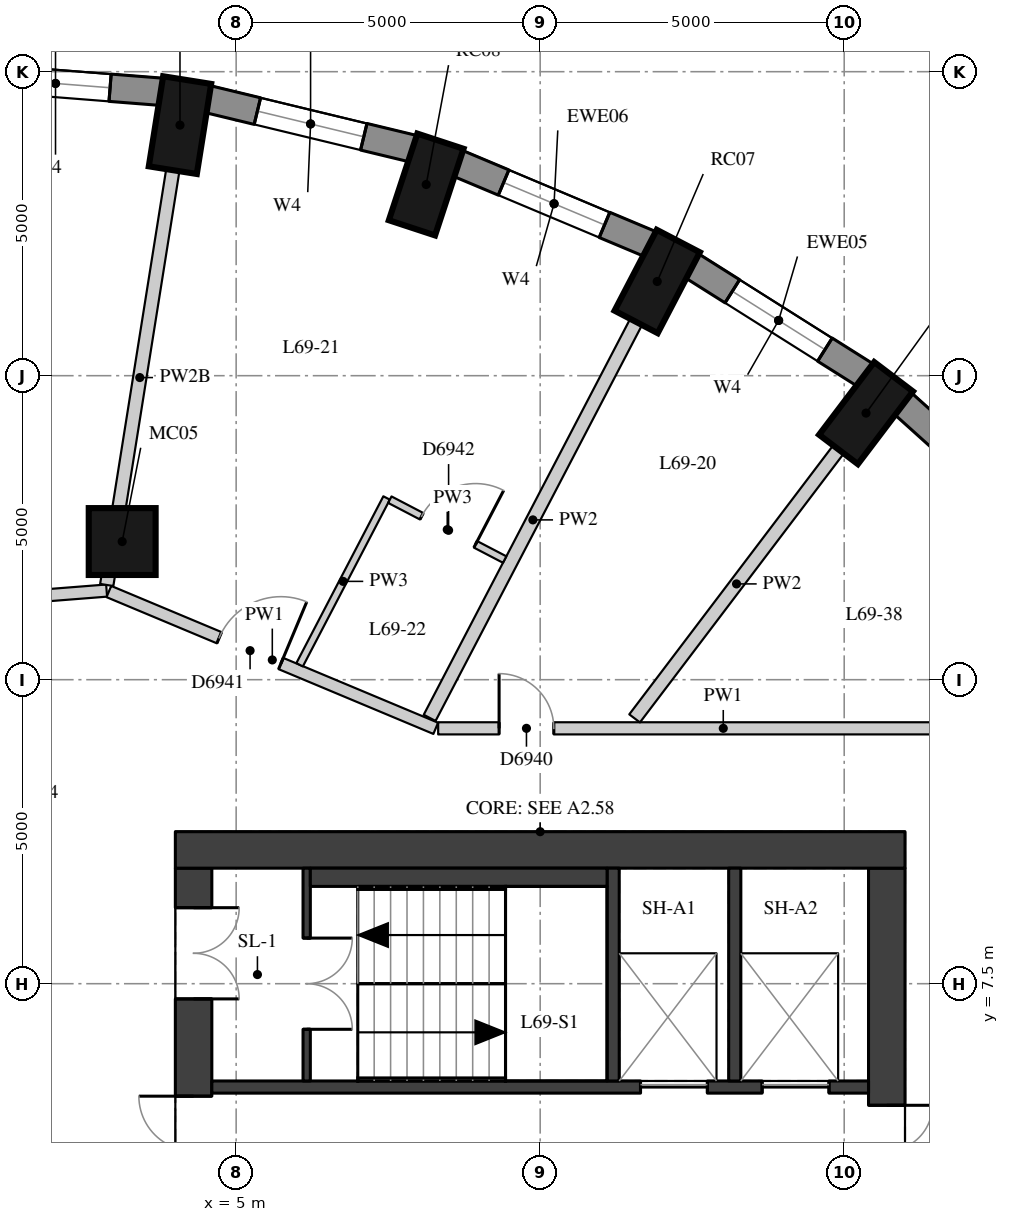
"""IFC4 building model, lengths in metres.
Left out: names, types, materials, properties, quantities, classifications, styles, units other than length and angle.
Written with IfcOpenShell. Run it as: python <this file> out.ifc"""

import sys

from ifc_helpers import new_model, si_unit, direction, frame, frame_2d, origin, origin_2d, place, context, subcontext, project, spatial, rectangle, extrude, element, fill, save


model = new_model("IFC4")
c1 = context("Model", 3, precision=1e-05, world=origin(), true_north=direction((0.0, 1.0)))
c2 = subcontext(c1, "Body", "Model", "MODEL_VIEW")
j1 = project(units=[si_unit("LENGTHUNIT", "METRE"), si_unit("PLANEANGLEUNIT", "RADIAN")], contexts=[c1])
p1 = place(None, origin())
s1 = spatial("IfcSite", under=j1, at=p1, CompositionType="ELEMENT")
p2 = place(p1, origin())
s2 = spatial("IfcBuilding", under=s1, at=p2, CompositionType="ELEMENT")
p3 = place(p2, frame((0.0, 0.0, 243.2)))
s3 = spatial("IfcBuildingStorey", under=s2, at=p3, CompositionType="ELEMENT", Elevation=243.2)
for number, where, z_axis, x_axis in (
    (1, (15.359, 16.885, 0.0), (0.0, 0.0, 1.0), (0.604, 0.797, 0.0)),
    (2, (11.925, 19.05, 0.0), (0.0, 0.0, 1.0), (0.462, 0.887, 0.0)),
    (3, (8.125, 20.644, 0.0), (0.0, 0.0, 1.0), (0.312, 0.95, 0.0)),
    (4, (4.076, 21.621, 0.0), (0.0, 0.0, 1.0), (0.157, 0.988, 0.0)),
):
    element("IfcColumn", number, at=place(p3, frame(where, z_axis=z_axis, x_axis=x_axis)), inside=s3, PredefinedType="COLUMN", context=c2, shape_type="SweptSolid", body=[
        extrude(rectangle(XDim=1.5, YDim=0.8, at=origin_2d()), origin(), (0.0, 0.0, 1.0), 3.3),
    ])
p4 = place(p3, frame((3.126, 14.772, 0.0), z_axis=(0.0, 0.0, 1.0), x_axis=(1.0, 0.0, 0.0)))
e5 = element("IfcColumn", 5, at=p4, inside=s3, PredefinedType="COLUMN", context=c2, shape_type="SweptSolid", body=[
    extrude(rectangle(XDim=1.1, YDim=1.1, at=origin_2d()), origin(), (0.0, 0.0, 1.0), 3.3),
])
p5 = place(p3, frame((18.424, 14.828, 0.0), z_axis=(0.0, 0.0, 1.0), x_axis=(-0.743166014219, 0.669107073128, 0.0)))
e6 = element("IfcWall", 6, at=p5, inside=s3, PredefinedType="SOLIDWALL", context=c2, shape_type="SweptSolid", body=[
    extrude(rectangle(XDim=3.316, YDim=0.45, at=frame_2d((1.658, 0.0))), origin(), (0.0, 0.0, 1.0), 3.02),
])
p6 = place(p3, frame((15.353, 17.506, 0.0), z_axis=(0.0, 0.0, 1.0), x_axis=(-0.845929139811, 0.53329531258, 0.0)))
e7 = element("IfcWall", 7, at=p6, inside=s3, PredefinedType="SOLIDWALL", context=c2, shape_type="SweptSolid", body=[
    extrude(rectangle(XDim=3.385, YDim=0.45, at=frame_2d((1.692, 0.0))), origin(), (0.0, 0.0, 1.0), 3.02),
])
p7 = place(p6, frame((0.792, 0.0, 0.4)))
e8 = element("IfcOpeningElement", 8, at=p7, cuts=e7, PredefinedType="OPENING", context=c2, shape_type="SweptSolid", body=[
    extrude(rectangle(XDim=1.8, YDim=1.75, at=frame_2d((0.9, 0.875))), frame((0.0, 0.235, 0.0), z_axis=(0.0, -1.0, 0.0), x_axis=(1.0, 0.0, 0.0)), (0.0, 0.0, 1.0), 0.47),
])
p8 = place(p3, frame((11.816, 19.662, 0.0), z_axis=(0.0, 0.0, 1.0), x_axis=(-0.922024627475, 0.387131226239, 0.0)))
e9 = element("IfcWall", 9, at=p8, inside=s3, PredefinedType="SOLIDWALL", context=c2, shape_type="SweptSolid", body=[
    extrude(rectangle(XDim=3.443, YDim=0.45, at=frame_2d((1.722, 0.0))), origin(), (0.0, 0.0, 1.0), 3.02),
])
p9 = place(p8, frame((0.822, 0.0, 0.4)))
e10 = element("IfcOpeningElement", 10, at=p9, cuts=e9, PredefinedType="OPENING", context=c2, shape_type="SweptSolid", body=[
    extrude(rectangle(XDim=1.8, YDim=1.75, at=frame_2d((0.9, 0.875))), frame((0.0, 0.235, 0.0), z_axis=(0.0, -1.0, 0.0), x_axis=(1.0, 0.0, 0.0)), (0.0, 0.0, 1.0), 0.47),
])
p10 = place(p3, frame((7.919, 21.232, 0.0), z_axis=(0.0, 0.0, 1.0), x_axis=(-0.972099278496, 0.23456980357, 0.0)))
e11 = element("IfcWall", 11, at=p10, inside=s3, PredefinedType="SOLIDWALL", context=c2, shape_type="SweptSolid", body=[
    extrude(rectangle(XDim=3.487, YDim=0.45, at=frame_2d((1.743, 0.0))), origin(), (0.0, 0.0, 1.0), 3.02),
])
p11 = place(p10, frame((0.843, 0.0, 0.4)))
e12 = element("IfcOpeningElement", 12, at=p11, cuts=e11, PredefinedType="OPENING", context=c2, shape_type="SweptSolid", body=[
    extrude(rectangle(XDim=1.8, YDim=1.75, at=frame_2d((0.9, 0.875))), frame((0.0, 0.235, 0.0), z_axis=(0.0, -1.0, 0.0), x_axis=(1.0, 0.0, 0.0)), (0.0, 0.0, 1.0), 0.47),
])
p12 = place(p3, frame((3.779, 22.169, 0.0), z_axis=(0.0, 0.0, 1.0), x_axis=(-0.996910775835, 0.078542377245, 0.0)))
e13 = element("IfcWall", 13, at=p12, inside=s3, PredefinedType="SOLIDWALL", context=c2, shape_type="SweptSolid", body=[
    extrude(rectangle(XDim=3.509, YDim=0.45, at=frame_2d((1.755, 0.0))), origin(), (0.0, 0.0, 1.0), 3.02),
])
p13 = place(p12, frame((0.855, 0.0, 0.4)))
e14 = element("IfcOpeningElement", 14, at=p13, cuts=e13, PredefinedType="OPENING", context=c2, shape_type="SweptSolid", body=[
    extrude(rectangle(XDim=1.8, YDim=1.75, at=frame_2d((0.9, 0.875))), frame((0.0, 0.235, 0.0), z_axis=(0.0, -1.0, 0.0), x_axis=(1.0, 0.0, 0.0)), (0.0, 0.0, 1.0), 0.47),
])
p14 = place(p3, frame((4.3, -9.4, 0.0), z_axis=(0.0, 0.0, 1.0), x_axis=(0.0, 1.0, 0.0)))
e15 = element("IfcWall", 15, at=p14, inside=s3, PredefinedType="SHEAR", context=c2, shape_type="SweptSolid", body=[
    extrude(rectangle(XDim=18.8, YDim=0.6, at=frame_2d((9.4, 0.0))), origin(), (0.0, 0.0, 1.0), 3.02),
])
p15 = place(p14, frame((0.65, 0.0, 0.0)))
e16 = element("IfcOpeningElement", 16, at=p15, cuts=e15, PredefinedType="OPENING", context=c2, shape_type="SweptSolid", body=[
    extrude(rectangle(XDim=1.5, YDim=2.1, at=frame_2d((0.75, 1.05))), frame((0.0, 0.31, 0.0), z_axis=(0.0, -1.0, 0.0), x_axis=(1.0, 0.0, 0.0)), (0.0, 0.0, 1.0), 0.62),
])
p16 = place(p14, frame((3.75, 0.0, 0.0)))
e17 = element("IfcOpeningElement", 17, at=p16, cuts=e15, PredefinedType="OPENING", context=c2, shape_type="SweptSolid", body=[
    extrude(rectangle(XDim=1.8, YDim=2.1, at=frame_2d((0.9, 1.05))), frame((0.0, 0.31, 0.0), z_axis=(0.0, -1.0, 0.0), x_axis=(1.0, 0.0, 0.0)), (0.0, 0.0, 1.0), 0.62),
])
p17 = place(p14, frame((6.25, 0.0, 0.0)))
e18 = element("IfcOpeningElement", 18, at=p17, cuts=e15, PredefinedType="OPENING", context=c2, shape_type="SweptSolid", body=[
    extrude(rectangle(XDim=1.1, YDim=2.1, at=frame_2d((0.55, 1.05))), frame((0.0, 0.31, 0.0), z_axis=(0.0, -1.0, 0.0), x_axis=(1.0, 0.0, 0.0)), (0.0, 0.0, 1.0), 0.62),
])
p18 = place(p14, frame((8.9, 0.0, 0.0)))
e19 = element("IfcOpeningElement", 19, at=p18, cuts=e15, PredefinedType="OPENING", context=c2, shape_type="SweptSolid", body=[
    extrude(rectangle(XDim=1.0, YDim=2.1, at=frame_2d((0.5, 1.05))), frame((0.0, 0.31, 0.0), z_axis=(0.0, -1.0, 0.0), x_axis=(1.0, 0.0, 0.0)), (0.0, 0.0, 1.0), 0.62),
])
p19 = place(p14, frame((11.45, 0.0, 0.0)))
e20 = element("IfcOpeningElement", 20, at=p19, cuts=e15, PredefinedType="OPENING", context=c2, shape_type="SweptSolid", body=[
    extrude(rectangle(XDim=1.1, YDim=2.1, at=frame_2d((0.55, 1.05))), frame((0.0, 0.31, 0.0), z_axis=(0.0, -1.0, 0.0), x_axis=(1.0, 0.0, 0.0)), (0.0, 0.0, 1.0), 0.62),
])
p20 = place(p14, frame((13.25, 0.0, 0.0)))
e21 = element("IfcOpeningElement", 21, at=p20, cuts=e15, PredefinedType="OPENING", context=c2, shape_type="SweptSolid", body=[
    extrude(rectangle(XDim=1.8, YDim=2.1, at=frame_2d((0.9, 1.05))), frame((0.0, 0.31, 0.0), z_axis=(0.0, -1.0, 0.0), x_axis=(1.0, 0.0, 0.0)), (0.0, 0.0, 1.0), 0.62),
])
p21 = place(p14, frame((16.65, 0.0, 0.0)))
e22 = element("IfcOpeningElement", 22, at=p21, cuts=e15, PredefinedType="OPENING", context=c2, shape_type="SweptSolid", body=[
    extrude(rectangle(XDim=1.5, YDim=2.1, at=frame_2d((0.75, 1.05))), frame((0.0, 0.31, 0.0), z_axis=(0.0, -1.0, 0.0), x_axis=(1.0, 0.0, 0.0)), (0.0, 0.0, 1.0), 0.62),
])
p22 = place(p3, frame((15.7, -9.4, 0.0), z_axis=(0.0, 0.0, 1.0), x_axis=(0.0, 1.0, 0.0)))
e23 = element("IfcWall", 23, at=p22, inside=s3, PredefinedType="SHEAR", context=c2, shape_type="SweptSolid", body=[
    extrude(rectangle(XDim=18.8, YDim=0.6, at=frame_2d((9.4, 0.0))), origin(), (0.0, 0.0, 1.0), 3.02),
])
p23 = place(p22, frame((13.4, 0.0, 0.0)))
e24 = element("IfcOpeningElement", 24, at=p23, cuts=e23, PredefinedType="OPENING", context=c2, shape_type="SweptSolid", body=[
    extrude(rectangle(XDim=1.5, YDim=2.1, at=frame_2d((0.75, 1.05))), frame((0.0, 0.31, 0.0), z_axis=(0.0, -1.0, 0.0), x_axis=(1.0, 0.0, 0.0)), (0.0, 0.0, 1.0), 0.62),
])
p24 = place(p22, frame((3.9, 0.0, 0.0)))
e25 = element("IfcOpeningElement", 25, at=p24, cuts=e23, PredefinedType="OPENING", context=c2, shape_type="SweptSolid", body=[
    extrude(rectangle(XDim=1.5, YDim=2.1, at=frame_2d((0.75, 1.05))), frame((0.0, 0.31, 0.0), z_axis=(0.0, -1.0, 0.0), x_axis=(1.0, 0.0, 0.0)), (0.0, 0.0, 1.0), 0.62),
])
p25 = place(p3, frame((4.0, 9.7, 0.0), z_axis=(0.0, 0.0, 1.0), x_axis=(1.0, 0.0, 0.0)))
e26 = element("IfcWall", 26, at=p25, inside=s3, PredefinedType="SHEAR", context=c2, shape_type="SweptSolid", body=[
    extrude(rectangle(XDim=12.0, YDim=0.6, at=frame_2d((6.0, 0.0))), origin(), (0.0, 0.0, 1.0), 3.02),
])
p26 = place(p3, frame((4.6, 5.8, 0.0), z_axis=(0.0, 0.0, 1.0), x_axis=(1.0, 0.0, 0.0)))
e27 = element("IfcWall", 27, at=p26, inside=s3, PredefinedType="SHEAR", context=c2, shape_type="SweptSolid", body=[
    extrude(rectangle(XDim=10.8, YDim=0.2, at=frame_2d((5.4, 0.0))), origin(), (0.0, 0.0, 1.0), 3.02),
])
p27 = place(p26, frame((7.05, 0.0, 0.0)))
e28 = element("IfcOpeningElement", 28, at=p27, cuts=e27, PredefinedType="OPENING", context=c2, shape_type="SweptSolid", body=[
    extrude(rectangle(XDim=1.1, YDim=2.1, at=frame_2d((0.55, 1.05))), frame((0.0, 0.11, 0.0), z_axis=(0.0, -1.0, 0.0), x_axis=(1.0, 0.0, 0.0)), (0.0, 0.0, 1.0), 0.22),
])
p28 = place(p26, frame((9.05, 0.0, 0.0)))
e29 = element("IfcOpeningElement", 29, at=p28, cuts=e27, PredefinedType="OPENING", context=c2, shape_type="SweptSolid", body=[
    extrude(rectangle(XDim=1.1, YDim=2.1, at=frame_2d((0.55, 1.05))), frame((0.0, 0.11, 0.0), z_axis=(0.0, -1.0, 0.0), x_axis=(1.0, 0.0, 0.0)), (0.0, 0.0, 1.0), 0.22),
])
for number, where, z_axis, x_axis in (
    (30, (11.2, 5.9, 0.0), (0.0, 0.0, 1.0), (0.0, 1.0, 0.0)),
    (31, (13.2, 5.9, 0.0), (0.0, 0.0, 1.0), (0.0, 1.0, 0.0)),
):
    element("IfcWall", number, at=place(p3, frame(where, z_axis=z_axis, x_axis=x_axis)), inside=s3, PredefinedType="SHEAR", context=c2, shape_type="SweptSolid", body=[
        extrude(rectangle(XDim=3.5, YDim=0.2, at=frame_2d((1.75, 0.0))), origin(), (0.0, 0.0, 1.0), 3.02),
    ])
p29 = place(p3, frame((6.16, 5.9, 0.0), z_axis=(0.0, 0.0, 1.0), x_axis=(0.0, 1.0, 0.0)))
e32 = element("IfcWall", 32, at=p29, inside=s3, PredefinedType="SHEAR", context=c2, shape_type="SweptSolid", body=[
    extrude(rectangle(XDim=3.5, YDim=0.12, at=frame_2d((1.75, 0.0))), origin(), (0.0, 0.0, 1.0), 3.02),
])
p30 = place(p29, frame((0.85, 0.0, 0.0)))
e33 = element("IfcOpeningElement", 33, at=p30, cuts=e32, PredefinedType="OPENING", context=c2, shape_type="SweptSolid", body=[
    extrude(rectangle(XDim=1.5, YDim=2.1, at=frame_2d((0.75, 1.05))), frame((0.0, 0.07, 0.0), z_axis=(0.0, -1.0, 0.0), x_axis=(1.0, 0.0, 0.0)), (0.0, 0.0, 1.0), 0.14),
])
p31 = place(p3, frame((6.22, 9.25, 0.0), z_axis=(0.0, 0.0, 1.0), x_axis=(1.0, 0.0, 0.0)))
e34 = element("IfcWall", 34, at=p31, inside=s3, PredefinedType="PARTITIONING", context=c2, shape_type="SweptSolid", body=[
    extrude(rectangle(XDim=4.88, YDim=0.3, at=frame_2d((2.44, 0.0))), origin(), (0.0, 0.0, 1.0), 3.02),
])
p32 = place(p3, frame((-7.58, 13.144, 0.0), z_axis=(0.0, 0.0, 1.0), x_axis=(0.996921908045, 0.078400951905, 0.0)))
e35 = element("IfcWall", 35, at=p32, inside=s3, PredefinedType="PARTITIONING", context=c2, shape_type="SweptSolid", body=[
    extrude(rectangle(XDim=10.482, YDim=0.2, at=frame_2d((5.241, 0.0))), origin(), (0.0, 0.0, 1.0), 2.57),
])
p33 = place(p32, frame((6.99, 0.0, 0.0)))
e36 = element("IfcOpeningElement", 36, at=p33, cuts=e35, PredefinedType="OPENING", context=c2, shape_type="SweptSolid", body=[
    extrude(rectangle(XDim=1.1, YDim=2.1, at=frame_2d((0.55, 1.05))), frame((0.0, 0.11, 0.0), z_axis=(0.0, -1.0, 0.0), x_axis=(1.0, 0.0, 0.0)), (0.0, 0.0, 1.0), 0.22),
])
p34 = place(p32, frame((2.696, 0.0, 0.0)))
e37 = element("IfcOpeningElement", 37, at=p34, cuts=e35, PredefinedType="OPENING", context=c2, shape_type="SweptSolid", body=[
    extrude(rectangle(XDim=0.9, YDim=2.1, at=frame_2d((0.45, 1.05))), frame((0.0, 0.11, 0.0), z_axis=(0.0, -1.0, 0.0), x_axis=(1.0, 0.0, 0.0)), (0.0, 0.0, 1.0), 0.22),
])
p35 = place(p3, frame((2.907, 13.95, 0.0), z_axis=(0.0, 0.0, 1.0), x_axis=(0.922453481254, -0.386108242494, 0.0)))
e38 = element("IfcWall", 38, at=p35, inside=s3, PredefinedType="PARTITIONING", context=c2, shape_type="SweptSolid", body=[
    extrude(rectangle(XDim=5.827, YDim=0.2, at=frame_2d((2.914, 0.0))), origin(), (0.0, 0.0, 1.0), 3.02),
])
p36 = place(p35, frame((1.968, 0.0, 0.0)))
e39 = element("IfcOpeningElement", 39, at=p36, cuts=e38, PredefinedType="OPENING", context=c2, shape_type="SweptSolid", body=[
    extrude(rectangle(XDim=1.1, YDim=2.1, at=frame_2d((0.55, 1.05))), frame((0.0, 0.11, 0.0), z_axis=(0.0, -1.0, 0.0), x_axis=(1.0, 0.0, 0.0)), (0.0, 0.0, 1.0), 0.22),
])
p37 = place(p3, frame((8.322, 11.7, 0.0), z_axis=(0.0, 0.0, 1.0), x_axis=(1.0, 0.0, 0.0)))
e40 = element("IfcWall", 40, at=p37, inside=s3, PredefinedType="PARTITIONING", context=c2, shape_type="SweptSolid", body=[
    extrude(rectangle(XDim=9.378, YDim=0.2, at=frame_2d((4.689, 0.0))), origin(), (0.0, 0.0, 1.0), 3.02),
])
p38 = place(p37, frame((1.002, 0.0, 0.0)))
e41 = element("IfcOpeningElement", 41, at=p38, cuts=e40, PredefinedType="OPENING", context=c2, shape_type="SweptSolid", body=[
    extrude(rectangle(XDim=0.9, YDim=2.1, at=frame_2d((0.45, 1.05))), frame((0.0, 0.11, 0.0), z_axis=(0.0, -1.0, 0.0), x_axis=(1.0, 0.0, 0.0)), (0.0, 0.0, 1.0), 0.22),
])
p39 = place(p3, frame((14.906, 16.287, 0.0), z_axis=(0.0, 0.0, 1.0), x_axis=(-0.604066831727, -0.796933662739, 0.0)))
e42 = element("IfcWall", 42, at=p39, inside=s3, PredefinedType="PARTITIONING", context=c2, shape_type="SweptSolid", body=[
    extrude(rectangle(XDim=5.551, YDim=0.22, at=frame_2d((2.775, 0.0))), origin(), (0.0, 0.0, 1.0), 3.02),
])
p40 = place(p3, frame((11.578, 18.385, 0.0), z_axis=(0.0, 0.0, 1.0), x_axis=(-0.462372875873, -0.886685583314, 0.0)))
e43 = element("IfcWall", 43, at=p40, inside=s3, PredefinedType="PARTITIONING", context=c2, shape_type="SweptSolid", body=[
    extrude(rectangle(XDim=7.345, YDim=0.22, at=frame_2d((3.672, 0.0))), origin(), (0.0, 0.0, 1.0), 3.02),
])
p41 = place(p3, frame((3.958, 20.88, 0.0), z_axis=(0.0, 0.0, 1.0), x_axis=(-0.157259964952, -0.987557240581, 0.0)))
e44 = element("IfcWall", 44, at=p41, inside=s3, PredefinedType="PARTITIONING", context=c2, shape_type="SweptSolid", body=[
    extrude(rectangle(XDim=6.908, YDim=0.22, at=frame_2d((3.454, 0.0))), origin(), (0.0, 0.0, 1.0), 2.57),
])
p42 = place(p3, frame((6.044, 12.745, 0.0), z_axis=(0.0, 0.0, 1.0), x_axis=(0.462331372195, 0.886707224672, 0.0)))
e45 = element("IfcWall", 45, at=p42, inside=s3, PredefinedType="PARTITIONING", context=c2, shape_type="SweptSolid", body=[
    extrude(rectangle(XDim=3.094, YDim=0.12, at=frame_2d((1.547, 0.0))), origin(), (0.0, 0.0, 1.0), 3.02),
])
p43 = place(p3, frame((7.527, 15.461, 0.0), z_axis=(0.0, 0.0, 1.0), x_axis=(0.88668701022, -0.462370139507, 0.0)))
e46 = element("IfcWall", 46, at=p43, inside=s3, PredefinedType="PARTITIONING", context=c2, shape_type="SweptSolid", body=[
    extrude(rectangle(XDim=2.13, YDim=0.12, at=frame_2d((1.065, 0.0))), origin(), (0.0, 0.0, 1.0), 3.02),
])
p44 = place(p43, frame((0.59, 0.0, 0.0)))
e47 = element("IfcOpeningElement", 47, at=p44, cuts=e46, PredefinedType="OPENING", context=c2, shape_type="SweptSolid", body=[
    extrude(rectangle(XDim=1.0, YDim=2.1, at=frame_2d((0.5, 1.05))), frame((0.0, 0.07, 0.0), z_axis=(0.0, -1.0, 0.0), x_axis=(1.0, 0.0, 0.0)), (0.0, 0.0, 1.0), 0.14),
])
p45 = place(p7, origin())
e48 = element("IfcWindow", 48, at=p45, inside=s3, PartitioningType="SINGLE_PANEL", PredefinedType="WINDOW", context=c2, shape_type="SweptSolid", body=[
    extrude(rectangle(XDim=1.8, YDim=1.75, at=frame_2d((0.9, 0.875))), frame((0.0, 0.035, 0.0), z_axis=(0.0, -1.0, 0.0), x_axis=(1.0, 0.0, 0.0)), (0.0, 0.0, 1.0), 0.06),
])
fill(e8, e48)
p46 = place(p9, origin())
e49 = element("IfcWindow", 49, at=p46, inside=s3, PartitioningType="SINGLE_PANEL", PredefinedType="WINDOW", context=c2, shape_type="SweptSolid", body=[
    extrude(rectangle(XDim=1.8, YDim=1.75, at=frame_2d((0.9, 0.875))), frame((0.0, 0.035, 0.0), z_axis=(0.0, -1.0, 0.0), x_axis=(1.0, 0.0, 0.0)), (0.0, 0.0, 1.0), 0.06),
])
fill(e10, e49)
p47 = place(p11, origin())
e50 = element("IfcWindow", 50, at=p47, inside=s3, PartitioningType="SINGLE_PANEL", PredefinedType="WINDOW", context=c2, shape_type="SweptSolid", body=[
    extrude(rectangle(XDim=1.8, YDim=1.75, at=frame_2d((0.9, 0.875))), frame((0.0, 0.035, 0.0), z_axis=(0.0, -1.0, 0.0), x_axis=(1.0, 0.0, 0.0)), (0.0, 0.0, 1.0), 0.06),
])
fill(e12, e50)
p48 = place(p13, origin())
e51 = element("IfcWindow", 51, at=p48, inside=s3, PartitioningType="SINGLE_PANEL", PredefinedType="WINDOW", context=c2, shape_type="SweptSolid", body=[
    extrude(rectangle(XDim=1.8, YDim=1.75, at=frame_2d((0.9, 0.875))), frame((0.0, 0.035, 0.0), z_axis=(0.0, -1.0, 0.0), x_axis=(1.0, 0.0, 0.0)), (0.0, 0.0, 1.0), 0.06),
])
fill(e14, e51)
p49 = place(p20, origin())
e52 = element("IfcDoor", 52, at=p49, inside=s3, OperationType="DOUBLE_DOOR_SINGLE_SWING", PredefinedType="DOOR", context=c2, shape_type="SweptSolid", body=[
    extrude(rectangle(XDim=1.8, YDim=2.1, at=frame_2d((0.9, 1.05))), frame((0.0, 0.025, 0.0), z_axis=(0.0, -1.0, 0.0), x_axis=(1.0, 0.0, 0.0)), (0.0, 0.0, 1.0), 0.05),
])
fill(e21, e52)
p50 = place(p21, origin())
e53 = element("IfcDoor", 53, at=p50, inside=s3, OperationType="DOUBLE_DOOR_SINGLE_SWING", PredefinedType="DOOR", context=c2, shape_type="SweptSolid", body=[
    extrude(rectangle(XDim=1.5, YDim=2.1, at=frame_2d((0.75, 1.05))), frame((0.0, 0.025, 0.0), z_axis=(0.0, -1.0, 0.0), x_axis=(1.0, 0.0, 0.0)), (0.0, 0.0, 1.0), 0.05),
])
fill(e22, e53)
p51 = place(p23, origin())
e54 = element("IfcDoor", 54, at=p51, inside=s3, OperationType="DOUBLE_DOOR_SINGLE_SWING", PredefinedType="DOOR", context=c2, shape_type="SweptSolid", body=[
    extrude(rectangle(XDim=1.5, YDim=2.1, at=frame_2d((0.75, 1.05))), frame((0.0, 0.025, 0.0), z_axis=(0.0, -1.0, 0.0), x_axis=(1.0, 0.0, 0.0)), (0.0, 0.0, 1.0), 0.05),
])
fill(e24, e54)
p52 = place(p30, origin())
e55 = element("IfcDoor", 55, at=p52, inside=s3, OperationType="DOUBLE_DOOR_SINGLE_SWING", PredefinedType="DOOR", context=c2, shape_type="SweptSolid", body=[
    extrude(rectangle(XDim=1.5, YDim=2.1, at=frame_2d((0.75, 1.05))), frame((0.0, 0.025, 0.0), z_axis=(0.0, -1.0, 0.0), x_axis=(1.0, 0.0, 0.0)), (0.0, 0.0, 1.0), 0.05),
])
fill(e33, e55)
p53 = place(p27, origin())
e56 = element("IfcDoor", 56, at=p53, inside=s3, OperationType="DOUBLE_DOOR_SLIDING", PredefinedType="DOOR", context=c2, shape_type="SweptSolid", body=[
    extrude(rectangle(XDim=1.1, YDim=2.1, at=frame_2d((0.55, 1.05))), frame((0.0, 0.025, 0.0), z_axis=(0.0, -1.0, 0.0), x_axis=(1.0, 0.0, 0.0)), (0.0, 0.0, 1.0), 0.05),
])
fill(e28, e56)
p54 = place(p28, origin())
e57 = element("IfcDoor", 57, at=p54, inside=s3, OperationType="DOUBLE_DOOR_SLIDING", PredefinedType="DOOR", context=c2, shape_type="SweptSolid", body=[
    extrude(rectangle(XDim=1.1, YDim=2.1, at=frame_2d((0.55, 1.05))), frame((0.0, 0.025, 0.0), z_axis=(0.0, -1.0, 0.0), x_axis=(1.0, 0.0, 0.0)), (0.0, 0.0, 1.0), 0.05),
])
fill(e29, e57)
p55 = place(p38, origin())
e58 = element("IfcDoor", 58, at=p55, inside=s3, OperationType="SINGLE_SWING_LEFT", PredefinedType="DOOR", context=c2, shape_type="SweptSolid", body=[
    extrude(rectangle(XDim=0.9, YDim=2.1, at=frame_2d((0.45, 1.05))), frame((0.0, 0.025, 0.0), z_axis=(0.0, -1.0, 0.0), x_axis=(1.0, 0.0, 0.0)), (0.0, 0.0, 1.0), 0.05),
])
fill(e41, e58)
p56 = place(p36, origin())
e59 = element("IfcDoor", 59, at=p56, inside=s3, OperationType="SINGLE_SWING_RIGHT", PredefinedType="DOOR", context=c2, shape_type="SweptSolid", body=[
    extrude(rectangle(XDim=1.1, YDim=2.1, at=frame_2d((0.55, 1.05))), frame((0.0, 0.025, 0.0), z_axis=(0.0, -1.0, 0.0), x_axis=(1.0, 0.0, 0.0)), (0.0, 0.0, 1.0), 0.05),
])
fill(e39, e59)
p57 = place(p44, origin())
e60 = element("IfcDoor", 60, at=p57, inside=s3, OperationType="SINGLE_SWING_RIGHT", PredefinedType="DOOR", context=c2, shape_type="SweptSolid", body=[
    extrude(rectangle(XDim=1.0, YDim=2.1, at=frame_2d((0.5, 1.05))), frame((0.0, 0.025, 0.0), z_axis=(0.0, -1.0, 0.0), x_axis=(1.0, 0.0, 0.0)), (0.0, 0.0, 1.0), 0.05),
])
fill(e47, e60)
save(model, sys.argv[1])
